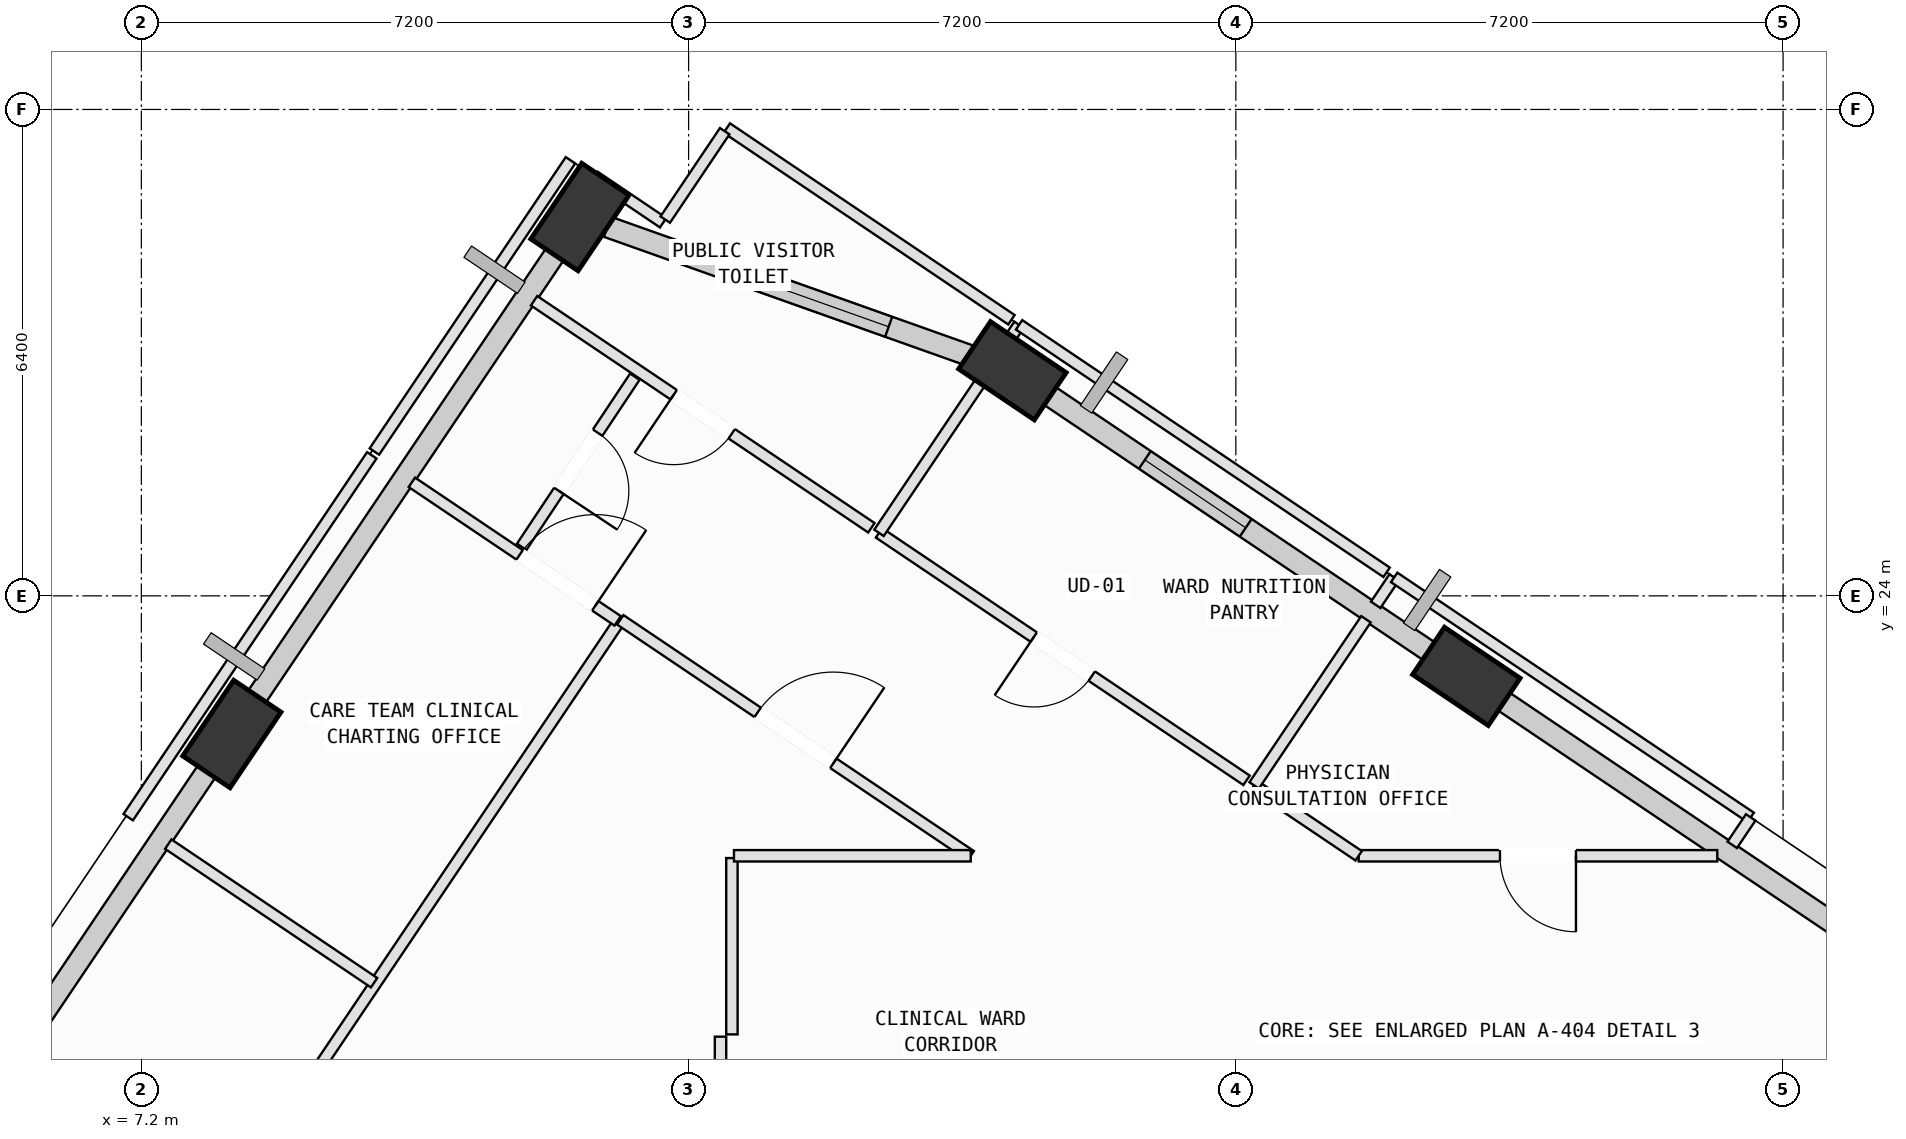
"""IFC4 building model, lengths in metres.
Left out: names, types, materials, properties, quantities, classifications, styles, units other than length and angle.
Written with IfcOpenShell. Run it as: python <this file> out.ifc"""

import sys

from ifc_helpers import new_model, si_unit, direction, frame, frame_2d, origin, origin_2d, place, context, subcontext, project, spatial, rectangle, extrude, element, fill, save


model = new_model("IFC4")
c1 = context("Model", 3, precision=1e-05, world=origin(), true_north=direction((0.0, 1.0)))
c2 = subcontext(c1, "Body", "Model", "MODEL_VIEW")
j1 = project(units=[si_unit("LENGTHUNIT", "METRE"), si_unit("PLANEANGLEUNIT", "RADIAN")], contexts=[c1])
p1 = place(None, origin())
s1 = spatial("IfcSite", under=j1, at=p1, CompositionType="ELEMENT")
p2 = place(p1, origin())
s2 = spatial("IfcBuilding", under=s1, at=p2, CompositionType="ELEMENT")
p3 = place(p2, frame((0.0, 0.0, 263.2)))
s3 = spatial("IfcBuildingStorey", under=s2, at=p3, CompositionType="ELEMENT", Elevation=263.2)
p4 = place(p3, frame((24.633, 22.941, 0.002), z_axis=(0.007986390085, -0.037044563242, 0.999281700977), x_axis=(-0.928505715107, 0.370714499893, 0.021163567343)))
e1 = element("IfcColumn", 1, at=p4, inside=s3, PredefinedType="COLUMN", context=c2, shape_type="SweptSolid", body=[
    extrude(rectangle(XDim=1.2, YDim=0.75, at=origin_2d()), origin(), (0.0, 0.0, 1.0), 3.974),
])
p5 = place(p3, frame((18.66, 26.962, 0.002), z_axis=(-0.008439776156, -0.061850622339, 0.998049733578), x_axis=(-0.746550173288, 0.664415153475, 0.03486176411)))
e2 = element("IfcColumn", 2, at=p5, inside=s3, PredefinedType="COLUMN", context=c2, shape_type="SweptSolid", body=[
    extrude(rectangle(XDim=1.2, YDim=0.75, at=origin_2d()), origin(), (0.0, 0.0, 1.0), 3.963),
])
p6 = place(p3, frame((12.97, 28.984, 0.002), z_axis=(-0.016568570157, -0.085315771703, 0.99621619219), x_axis=(0.705770066577, 0.704763149468, 0.072093801918)))
e3 = element("IfcColumn", 3, at=p6, inside=s3, PredefinedType="COLUMN", context=c2, shape_type="SweptSolid", body=[
    extrude(rectangle(XDim=1.2, YDim=0.75, at=origin_2d()), origin(), (0.0, 0.0, 1.0), 3.949),
])
p7 = place(p3, frame((8.391, 22.182, 0.002), z_axis=(0.01163978478, -0.103891270537, 0.994520547458), x_axis=(0.463142262868, 0.882031149655, 0.086719636662)))
e4 = element("IfcColumn", 4, at=p7, inside=s3, PredefinedType="COLUMN", context=c2, shape_type="SweptSolid", body=[
    extrude(rectangle(XDim=1.2, YDim=0.75, at=origin_2d()), origin(), (0.0, 0.0, 1.0), 3.943),
])
p8 = place(p3, frame((25.005, 22.69, 0.0), z_axis=(0.0, 0.0, 1.0), x_axis=(0.829509910624, -0.558491994729, 0.0)))
e5 = element("IfcWall", 5, at=p8, inside=s3, PredefinedType="SOLIDWALL", context=c2, shape_type="SweptSolid", body=[
    extrude(rectangle(XDim=6.958, YDim=0.28, at=frame_2d((3.479, 0.0))), origin(), (0.0, 0.0, 1.0), 3.085),
])
p9 = place(p3, frame((19.023, 26.718, 0.0), z_axis=(0.0, 0.0, 1.0), x_axis=(0.82952172504, -0.558474446762, 0.0)))
e6 = element("IfcWall", 6, at=p9, inside=s3, PredefinedType="SOLIDWALL", context=c2, shape_type="SweptSolid", body=[
    extrude(rectangle(XDim=6.424, YDim=0.28, at=frame_2d((3.212, 0.0))), origin(), (0.0, 0.0, 1.0), 3.185),
])
p10 = place(p9, frame((1.664, 0.0, 0.75)))
e7 = element("IfcOpeningElement", 7, at=p10, cuts=e6, PredefinedType="OPENING", context=c2, shape_type="SweptSolid", body=[
    extrude(rectangle(XDim=1.6, YDim=1.95, at=frame_2d((0.8, 0.975))), frame((0.0, 0.15, 0.0), z_axis=(0.0, -1.0, 0.0), x_axis=(1.0, 0.0, 0.0)), (0.0, 0.0, 1.0), 0.3),
])
p11 = place(p3, frame((13.332, 28.856, 0.0), z_axis=(0.0, 0.0, 1.0), x_axis=(0.942235680528, -0.334950626721, 0.0)))
e8 = element("IfcWall", 8, at=p11, inside=s3, PredefinedType="SOLIDWALL", context=c2, shape_type="SweptSolid", body=[
    extrude(rectangle(XDim=5.303, YDim=0.28, at=frame_2d((2.651, 0.0))), origin(), (0.0, 0.0, 1.0), 3.185),
])
p12 = place(p11, frame((1.927, 0.0, 0.75)))
e9 = element("IfcOpeningElement", 9, at=p12, cuts=e8, PredefinedType="OPENING", context=c2, shape_type="SweptSolid", body=[
    extrude(rectangle(XDim=2.0, YDim=1.95, at=frame_2d((1.0, 0.975))), frame((0.0, 0.15, 0.0), z_axis=(0.0, -1.0, 0.0), x_axis=(1.0, 0.0, 0.0)), (0.0, 0.0, 1.0), 0.3),
])
p13 = place(p3, frame((8.51, 22.36, 0.0), z_axis=(0.0, 0.0, 1.0), x_axis=(0.558483719986, 0.829515481779, 0.0)))
e10 = element("IfcWall", 10, at=p13, inside=s3, PredefinedType="SOLIDWALL", context=c2, shape_type="SweptSolid", body=[
    extrude(rectangle(XDim=7.434, YDim=0.28, at=frame_2d((3.717, 0.0))), origin(), (0.0, 0.0, 1.0), 3.185),
])
p14 = place(p3, frame((3.913, 15.531, 0.0), z_axis=(0.0, 0.0, 1.0), x_axis=(0.558465728622, 0.82952759445, 0.0)))
e11 = element("IfcWall", 11, at=p14, inside=s3, PredefinedType="SOLIDWALL", context=c2, shape_type="SweptSolid", body=[
    extrude(rectangle(XDim=7.485, YDim=0.28, at=frame_2d((3.742, 0.0))), origin(), (0.0, 0.0, 1.0), 3.185),
])
p15 = place(p3, frame((14.97, 20.55, 0.0), z_axis=(0.0, 0.0, 1.0), x_axis=(0.0, -1.0, 0.0)))
e12 = element("IfcWall", 12, at=p15, inside=s3, PredefinedType="PARTITIONING", context=c2, shape_type="SweptSolid", body=[
    extrude(rectangle(XDim=2.32, YDim=0.15, at=frame_2d((1.16, 0.0))), origin(), (0.0, 0.0, 1.0), 3.7),
])
p16 = place(p3, frame((14.82, 18.2, 0.0), z_axis=(0.0, 0.0, 1.0), x_axis=(0.0, -1.0, 0.0)))
e13 = element("IfcWall", 13, at=p16, inside=s3, PredefinedType="PARTITIONING", context=c2, shape_type="SweptSolid", body=[
    extrude(rectangle(XDim=2.94, YDim=0.15, at=frame_2d((1.47, 0.0))), origin(), (0.0, 0.0, 1.0), 3.7),
])
p17 = place(p3, frame((5.37, 11.607, 0.0), z_axis=(0.0, 0.0, 1.0), x_axis=(0.55844028066, 0.829544726303, 0.0)))
e14 = element("IfcWall", 14, at=p17, inside=s3, PredefinedType="PARTITIONING", context=c2, shape_type="SweptSolid", body=[
    extrude(rectangle(XDim=14.56, YDim=0.15, at=frame_2d((7.28, 0.0))), origin(), (0.0, 0.0, 1.0), 3.7),
])
p18 = place(p3, frame((13.501, 23.685, 0.0), z_axis=(0.0, 0.0, 1.0), x_axis=(0.829473884123, -0.558545499988, 0.0)))
e15 = element("IfcWall", 15, at=p18, inside=s3, PredefinedType="PARTITIONING", context=c2, shape_type="SweptSolid", body=[
    extrude(rectangle(XDim=5.559, YDim=0.15, at=frame_2d((2.78, 0.0))), origin(), (0.0, 0.0, 1.0), 3.335),
])
p19 = place(p18, frame((2.179, 0.0, 0.0)))
e16 = element("IfcOpeningElement", 16, at=p19, cuts=e15, PredefinedType="OPENING", context=c2, shape_type="SweptSolid", body=[
    extrude(rectangle(XDim=1.2, YDim=2.15, at=frame_2d((0.6, 1.075))), frame((0.0, 0.085, 0.0), z_axis=(0.0, -1.0, 0.0), x_axis=(1.0, 0.0, 0.0)), (0.0, 0.0, 1.0), 0.17),
])
p20 = place(p3, frame((18.112, 20.58, 0.0), z_axis=(0.0, 0.0, 1.0), x_axis=(-1.0, 0.0, 0.0)))
e17 = element("IfcWall", 17, at=p20, inside=s3, PredefinedType="PARTITIONING", context=c2, shape_type="SweptSolid", body=[
    extrude(rectangle(XDim=3.115, YDim=0.15, at=frame_2d((1.558, 0.0))), origin(), (0.0, 0.0, 1.0), 3.7),
])
p21 = place(p3, frame((27.934, 20.58, 0.0), z_axis=(0.0, 0.0, 1.0), x_axis=(-1.0, 0.0, 0.0)))
e18 = element("IfcWall", 18, at=p21, inside=s3, PredefinedType="PARTITIONING", context=c2, shape_type="SweptSolid", body=[
    extrude(rectangle(XDim=4.718, YDim=0.15, at=frame_2d((2.359, 0.0))), origin(), (0.0, 0.0, 1.0), 3.335),
])
p22 = place(p21, frame((1.859, 0.0, 0.0)))
e19 = element("IfcOpeningElement", 19, at=p22, cuts=e18, PredefinedType="OPENING", context=c2, shape_type="SweptSolid", body=[
    extrude(rectangle(XDim=1.0, YDim=2.12, at=frame_2d((0.5, 1.06))), frame((0.0, 0.085, 0.0), z_axis=(0.0, -1.0, 0.0), x_axis=(1.0, 0.0, 0.0)), (0.0, 0.0, 1.0), 0.17),
])
p23 = place(p3, frame((23.216, 20.58, 0.0), z_axis=(0.0, 0.0, 1.0), x_axis=(-0.82943553456, 0.558602447192, 0.0)))
e20 = element("IfcWall", 20, at=p23, inside=s3, PredefinedType="PARTITIONING", context=c2, shape_type="SweptSolid", body=[
    extrude(rectangle(XDim=1.658, YDim=0.15, at=frame_2d((0.829, 0.0))), origin(), (0.0, 0.0, 1.0), 3.335),
])
p24 = place(p3, frame((21.841, 21.506, 0.0), z_axis=(0.0, 0.0, 1.0), x_axis=(0.558308913706, 0.82963314596, 0.0)))
e21 = element("IfcWall", 21, at=p24, inside=s3, PredefinedType="PARTITIONING", context=c2, shape_type="SweptSolid", body=[
    extrude(rectangle(XDim=2.635, YDim=0.15, at=frame_2d((1.317, 0.0))), origin(), (0.0, 0.0, 1.0), 3.7),
])
p25 = place(p3, frame((23.44, 23.882, 0.0), z_axis=(0.0, 0.0, 1.0), x_axis=(0.558836686055, 0.829277732921, 0.0)))
e22 = element("IfcWall", 22, at=p25, inside=s3, PredefinedType="PARTITIONING", context=c2, shape_type="SweptSolid", body=[
    extrude(rectangle(XDim=0.435, YDim=0.15, at=frame_2d((0.218, 0.0))), origin(), (0.0, 0.0, 1.0), 3.7),
])
p26 = place(p3, frame((23.683, 24.243, 0.0), z_axis=(0.0, 0.0, 1.0), x_axis=(0.829537746858, -0.558450648257, 0.0)))
e23 = element("IfcWall", 23, at=p26, inside=s3, PredefinedType="PARTITIONING", context=c2, shape_type="SweptSolid", body=[
    extrude(rectangle(XDim=5.655, YDim=0.15, at=frame_2d((2.827, 0.0))), origin(), (0.0, 0.0, 1.0), 3.7),
])
p27 = place(p3, frame((28.374, 21.085, 0.0), z_axis=(0.0, 0.0, 1.0), x_axis=(-0.558450648257, -0.829537746858, 0.0)))
e24 = element("IfcWall", 24, at=p27, inside=s3, PredefinedType="PARTITIONING", context=c2, shape_type="SweptSolid", body=[
    extrude(rectangle(XDim=0.435, YDim=0.15, at=frame_2d((0.218, 0.0))), origin(), (0.0, 0.0, 1.0), 3.7),
])
p28 = place(p3, frame((21.741, 21.573, 0.0), z_axis=(0.0, 0.0, 1.0), x_axis=(-0.829496713861, 0.55851159495, 0.0)))
e25 = element("IfcWall", 25, at=p28, inside=s3, PredefinedType="PARTITIONING", context=c2, shape_type="SweptSolid", body=[
    extrude(rectangle(XDim=5.83, YDim=0.15, at=frame_2d((2.915, 0.0))), origin(), (0.0, 0.0, 1.0), 3.7),
])
p29 = place(p28, frame((2.455, 0.0, 0.0)))
e26 = element("IfcOpeningElement", 26, at=p29, cuts=e25, PredefinedType="OPENING", context=c2, shape_type="SweptSolid", body=[
    extrude(rectangle(XDim=0.92, YDim=2.1, at=frame_2d((0.46, 1.05))), frame((0.0, 0.085, 0.0), z_axis=(0.0, -1.0, 0.0), x_axis=(1.0, 0.0, 0.0)), (0.0, 0.0, 1.0), 0.17),
])
p30 = place(p3, frame((16.905, 24.829, 0.0), z_axis=(0.0, 0.0, 1.0), x_axis=(0.558543166336, 0.829475455538, 0.0)))
e27 = element("IfcWall", 27, at=p30, inside=s3, PredefinedType="PARTITIONING", context=c2, shape_type="SweptSolid", body=[
    extrude(rectangle(XDim=2.576, YDim=0.15, at=frame_2d((1.288, 0.0))), origin(), (0.0, 0.0, 1.0), 3.7),
])
p31 = place(p3, frame((18.44, 27.108, 0.0), z_axis=(0.0, 0.0, 1.0), x_axis=(0.558165620005, 0.829729558739, 0.0)))
e28 = element("IfcWall", 28, at=p31, inside=s3, PredefinedType="PARTITIONING", context=c2, shape_type="SweptSolid", body=[
    extrude(rectangle(XDim=0.552, YDim=0.15, at=frame_2d((0.276, 0.0))), origin(), (0.0, 0.0, 1.0), 3.7),
])
p32 = place(p3, frame((18.748, 27.566, 0.0), z_axis=(0.0, 0.0, 1.0), x_axis=(0.829516114671, -0.55848277995, 0.0)))
e29 = element("IfcWall", 29, at=p32, inside=s3, PredefinedType="PARTITIONING", context=c2, shape_type="SweptSolid", body=[
    extrude(rectangle(XDim=5.83, YDim=0.15, at=frame_2d((2.915, 0.0))), origin(), (0.0, 0.0, 1.0), 3.7),
])
p33 = place(p3, frame((14.903, 30.155, 0.0), z_axis=(0.0, 0.0, 1.0), x_axis=(0.829445619177, -0.558587472853, 0.0)))
e30 = element("IfcWall", 30, at=p33, inside=s3, PredefinedType="PARTITIONING", context=c2, shape_type="SweptSolid", body=[
    extrude(rectangle(XDim=4.515, YDim=0.15, at=frame_2d((2.257, 0.0))), origin(), (0.0, 0.0, 1.0), 3.7),
])
p34 = place(p3, frame((16.805, 24.896, 0.0), z_axis=(0.0, 0.0, 1.0), x_axis=(-0.829591813008, 0.558370328537, 0.0)))
e31 = element("IfcWall", 31, at=p34, inside=s3, PredefinedType="PARTITIONING", context=c2, shape_type="SweptSolid", body=[
    extrude(rectangle(XDim=5.35, YDim=0.15, at=frame_2d((2.675, 0.0))), origin(), (0.0, 0.0, 1.0), 3.7),
])
p35 = place(p34, frame((2.215, 0.0, 0.0)))
e32 = element("IfcOpeningElement", 32, at=p35, cuts=e31, PredefinedType="OPENING", context=c2, shape_type="SweptSolid", body=[
    extrude(rectangle(XDim=0.92, YDim=2.1, at=frame_2d((0.46, 1.05))), frame((0.0, 0.085, 0.0), z_axis=(0.0, -1.0, 0.0), x_axis=(1.0, 0.0, 0.0)), (0.0, 0.0, 1.0), 0.17),
])
p36 = place(p3, frame((12.504, 28.633, 0.0), z_axis=(0.0, 0.0, 1.0), x_axis=(0.558985889655, 0.829177167538, 0.0)))
e33 = element("IfcWall", 33, at=p36, inside=s3, PredefinedType="PARTITIONING", context=c2, shape_type="SweptSolid", body=[
    extrude(rectangle(XDim=1.102, YDim=0.15, at=frame_2d((0.551, 0.0))), origin(), (0.0, 0.0, 1.0), 3.185),
])
p37 = place(p3, frame((13.161, 29.519, 0.0), z_axis=(0.0, 0.0, 1.0), x_axis=(0.829318319501, -0.558776453458, 0.0)))
e34 = element("IfcWall", 34, at=p37, inside=s3, PredefinedType="PARTITIONING", context=c2, shape_type="SweptSolid", body=[
    extrude(rectangle(XDim=1.09, YDim=0.15, at=frame_2d((0.545, 0.0))), origin(), (0.0, 0.0, 1.0), 3.7),
])
p38 = place(p3, frame((14.093, 28.951, 0.0), z_axis=(0.0, 0.0, 1.0), x_axis=(0.557952087343, 0.829873163941, 0.0)))
e35 = element("IfcWall", 35, at=p38, inside=s3, PredefinedType="PARTITIONING", context=c2, shape_type="SweptSolid", body=[
    extrude(rectangle(XDim=1.402, YDim=0.15, at=frame_2d((0.701, 0.0))), origin(), (0.0, 0.0, 1.0), 3.7),
])
p39 = place(p3, frame((7.027, 21.088, 0.0), z_axis=(0.0, 0.0, 1.0), x_axis=(0.558395509972, 0.829574863676, 0.0)))
e36 = element("IfcWall", 36, at=p39, inside=s3, PredefinedType="PARTITIONING", context=c2, shape_type="SweptSolid", body=[
    extrude(rectangle(XDim=5.739, YDim=0.15, at=frame_2d((2.87, 0.0))), origin(), (0.0, 0.0, 1.0), 3.7),
])
p40 = place(p3, frame((10.759, 25.494, 0.0), z_axis=(0.0, 0.0, 1.0), x_axis=(0.829545107269, -0.558439714747, 0.0)))
e37 = element("IfcWall", 37, at=p40, inside=s3, PredefinedType="PARTITIONING", context=c2, shape_type="SweptSolid", body=[
    extrude(rectangle(XDim=3.264, YDim=0.15, at=frame_2d((1.632, 0.0))), origin(), (0.0, 0.0, 1.0), 3.7),
])
p41 = place(p40, frame((1.709, 0.0, 0.0)))
e38 = element("IfcOpeningElement", 38, at=p41, cuts=e37, PredefinedType="OPENING", context=c2, shape_type="SweptSolid", body=[
    extrude(rectangle(XDim=1.2, YDim=2.15, at=frame_2d((0.6, 1.075))), frame((0.0, 0.085, 0.0), z_axis=(0.0, -1.0, 0.0), x_axis=(1.0, 0.0, 0.0)), (0.0, 0.0, 1.0), 0.17),
])
p42 = place(p3, frame((10.262, 18.91, 0.0), z_axis=(0.0, 0.0, 1.0), x_axis=(-0.829545107269, 0.558439714747, 0.0)))
e39 = element("IfcWall", 39, at=p42, inside=s3, PredefinedType="PARTITIONING", context=c2, shape_type="SweptSolid", body=[
    extrude(rectangle(XDim=3.264, YDim=0.15, at=frame_2d((1.632, 0.0))), origin(), (0.0, 0.0, 1.0), 3.7),
])
p43 = place(p3, frame((13.693, 26.884, 0.0), z_axis=(0.0, 0.0, 1.0), x_axis=(-0.553756971874, -0.832678338917, 0.0)))
e40 = element("IfcWall", 40, at=p43, inside=s3, PredefinedType="PARTITIONING", context=c2, shape_type="SweptSolid", body=[
    extrude(rectangle(XDim=2.689, YDim=0.15, at=frame_2d((1.344, 0.0))), origin(), (0.0, 0.0, 1.0), 3.7),
])
p44 = place(p43, frame((0.885, 0.0, 0.0)))
e41 = element("IfcOpeningElement", 41, at=p44, cuts=e40, PredefinedType="OPENING", context=c2, shape_type="SweptSolid", body=[
    extrude(rectangle(XDim=0.92, YDim=2.1, at=frame_2d((0.46, 1.05))), frame((0.0, 0.085, 0.0), z_axis=(0.0, -1.0, 0.0), x_axis=(1.0, 0.0, 0.0)), (0.0, 0.0, 1.0), 0.17),
])
p45 = place(p3, frame((10.266, 25.899, 0.0), z_axis=(0.0, 0.0, 1.0), x_axis=(0.558463098819, 0.829529364916, 0.0)))
e42 = element("IfcWall", 42, at=p45, inside=s3, PredefinedType="PARTITIONING", context=c2, shape_type="SweptSolid", body=[
    extrude(rectangle(XDim=4.62, YDim=0.15, at=frame_2d((2.31, 0.0))), origin(), (0.0, 0.0, 1.0), 3.7),
])
p46 = place(p10, origin())
e43 = element("IfcWindow", 43, at=p46, inside=s3, PartitioningType="SINGLE_PANEL", PredefinedType="WINDOW", context=c2, shape_type="SweptSolid", body=[
    extrude(rectangle(XDim=1.6, YDim=1.95, at=frame_2d((0.8, 0.975))), frame((0.0, 0.03, 0.0), z_axis=(0.0, -1.0, 0.0), x_axis=(1.0, 0.0, 0.0)), (0.0, 0.0, 1.0), 0.06),
])
fill(e7, e43)
p47 = place(p12, origin())
e44 = element("IfcWindow", 44, at=p47, inside=s3, PartitioningType="SINGLE_PANEL", PredefinedType="WINDOW", context=c2, shape_type="SweptSolid", body=[
    extrude(rectangle(XDim=2.0, YDim=1.95, at=frame_2d((1.0, 0.975))), frame((0.0, 0.03, 0.0), z_axis=(0.0, -1.0, 0.0), x_axis=(1.0, 0.0, 0.0)), (0.0, 0.0, 1.0), 0.06),
])
fill(e9, e44)
p48 = place(p19, origin())
e45 = element("IfcDoor", 45, at=p48, inside=s3, OperationType="SINGLE_SWING_RIGHT", PredefinedType="DOOR", context=c2, shape_type="SweptSolid", body=[
    extrude(rectangle(XDim=1.2, YDim=2.15, at=frame_2d((0.6, 1.075))), frame((0.0, 0.025, 0.0), z_axis=(0.0, -1.0, 0.0), x_axis=(1.0, 0.0, 0.0)), (0.0, 0.0, 1.0), 0.05),
])
fill(e16, e45)
p49 = place(p22, origin())
e46 = element("IfcDoor", 46, at=p49, inside=s3, OperationType="SINGLE_SWING_LEFT", PredefinedType="DOOR", context=c2, shape_type="SweptSolid", body=[
    extrude(rectangle(XDim=1.0, YDim=2.12, at=frame_2d((0.5, 1.06))), frame((0.0, 0.025, 0.0), z_axis=(0.0, -1.0, 0.0), x_axis=(1.0, 0.0, 0.0)), (0.0, 0.0, 1.0), 0.05),
])
fill(e19, e46)
p50 = place(p29, origin())
e47 = element("IfcDoor", 47, at=p50, inside=s3, OperationType="SINGLE_SWING_RIGHT", PredefinedType="DOOR", context=c2, shape_type="SweptSolid", body=[
    extrude(rectangle(XDim=0.92, YDim=2.1, at=frame_2d((0.46, 1.05))), frame((0.0, 0.025, 0.0), z_axis=(0.0, -1.0, 0.0), x_axis=(1.0, 0.0, 0.0)), (0.0, 0.0, 1.0), 0.05),
])
fill(e26, e47)
p51 = place(p35, origin())
e48 = element("IfcDoor", 48, at=p51, inside=s3, OperationType="SINGLE_SWING_RIGHT", PredefinedType="DOOR", context=c2, shape_type="SweptSolid", body=[
    extrude(rectangle(XDim=0.92, YDim=2.1, at=frame_2d((0.46, 1.05))), frame((0.0, 0.025, 0.0), z_axis=(0.0, -1.0, 0.0), x_axis=(1.0, 0.0, 0.0)), (0.0, 0.0, 1.0), 0.05),
])
fill(e32, e48)
p52 = place(p41, origin())
e49 = element("IfcDoor", 49, at=p52, inside=s3, OperationType="SINGLE_SWING_RIGHT", PredefinedType="DOOR", context=c2, shape_type="SweptSolid", body=[
    extrude(rectangle(XDim=1.2, YDim=2.15, at=frame_2d((0.6, 1.075))), frame((0.0, 0.025, 0.0), z_axis=(0.0, -1.0, 0.0), x_axis=(1.0, 0.0, 0.0)), (0.0, 0.0, 1.0), 0.05),
])
fill(e38, e49)
p53 = place(p44, origin())
e50 = element("IfcDoor", 50, at=p53, inside=s3, OperationType="SINGLE_SWING_RIGHT", PredefinedType="DOOR", context=c2, shape_type="SweptSolid", body=[
    extrude(rectangle(XDim=0.92, YDim=2.1, at=frame_2d((0.46, 1.05))), frame((0.0, 0.025, 0.0), z_axis=(0.0, -1.0, 0.0), x_axis=(1.0, 0.0, 0.0)), (0.0, 0.0, 1.0), 0.05),
])
fill(e41, e50)
save(model, sys.argv[1])
